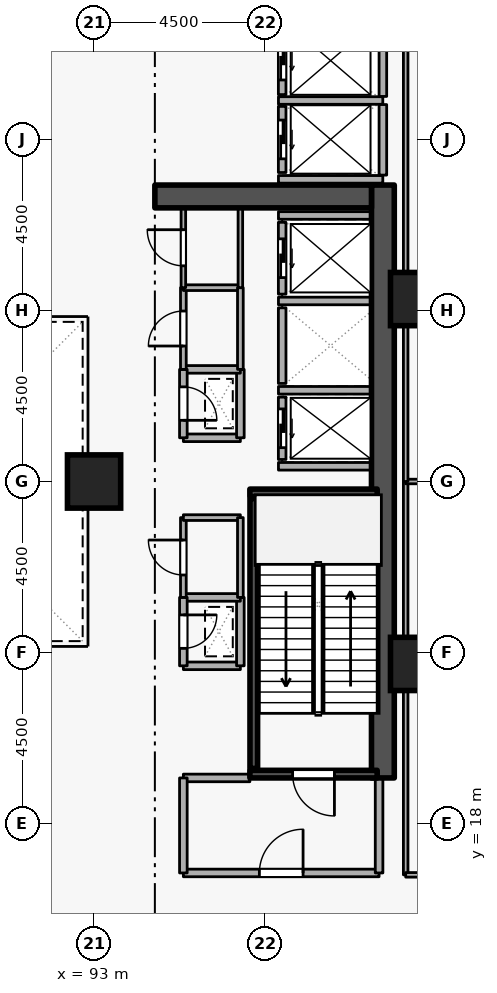
"""IFC4 building model, lengths in metres.
Left out: names, types, materials, properties, quantities, classifications, styles, units other than length and angle.
Written with IfcOpenShell. Run it as: python <this file> out.ifc"""

import sys

from ifc_helpers import new_model, si_unit, direction, frame, frame_2d, origin, origin_2d, place, context, subcontext, project, spatial, rectangle, extrude, element, fill, save


model = new_model("IFC4")
c1 = context("Model", 3, precision=1e-05, world=origin(), true_north=direction((0.0, 1.0)))
c2 = subcontext(c1, "Body", "Model", "MODEL_VIEW")
j1 = project(units=[si_unit("LENGTHUNIT", "METRE"), si_unit("PLANEANGLEUNIT", "RADIAN")], contexts=[c1])
p1 = place(None, origin())
s1 = spatial("IfcSite", under=j1, at=p1, CompositionType="ELEMENT")
p2 = place(p1, origin())
s2 = spatial("IfcBuilding", under=s1, at=p2, CompositionType="ELEMENT")
p3 = place(p2, frame((0.0, 0.0, 23.1)))
s3 = spatial("IfcBuildingStorey", under=s2, at=p3, CompositionType="ELEMENT", Elevation=23.1)
p4 = place(p3, frame((100.6, 19.2, 0.0), z_axis=(0.0, 0.0, 1.0), x_axis=(0.0, 1.0, 0.0)))
e1 = element("IfcWall", 1, at=p4, inside=s3, PredefinedType="SHEAR", context=c2, shape_type="SweptSolid", body=[
    extrude(rectangle(XDim=15.6, YDim=0.6, at=frame_2d((7.8, 0.0))), origin(), (0.0, 0.0, 1.0), 4.8),
])
p5 = place(p3, frame((94.6, 34.5, 0.0), z_axis=(0.0, 0.0, 1.0), x_axis=(1.0, 0.0, 0.0)))
e2 = element("IfcWall", 2, at=p5, inside=s3, PredefinedType="SHEAR", context=c2, shape_type="SweptSolid", body=[
    extrude(rectangle(XDim=5.7, YDim=0.6, at=frame_2d((2.85, 0.0))), origin(), (0.0, 0.0, 1.0), 4.8),
])
for number, where, z_axis, x_axis in (
    (3, (101.5, 22.2, 0.0), (0.0, 0.0, 1.0), (1.0, 0.0, 0.0)),
    (4, (101.5, 31.8, 0.0), (0.0, 0.0, 1.0), (1.0, 0.0, 0.0)),
    (5, (93.0, 27.0, 0.0), (0.0, 0.0, 1.0), (1.0, 0.0, 0.0)),
):
    element("IfcColumn", number, at=place(p3, frame(where, z_axis=z_axis, x_axis=x_axis)), inside=s3, PredefinedType="COLUMN", context=c2, shape_type="SweptSolid", body=[
        extrude(rectangle(XDim=1.4, YDim=1.4, at=origin_2d()), origin(), (0.0, 0.0, 1.0), 4.8),
    ])
p6 = place(p3, frame((97.95, 29.22, 0.0), z_axis=(0.0, 0.0, 1.0), x_axis=(0.0, -1.0, 0.0)))
e6 = element("IfcWall", 6, at=p6, inside=s3, PredefinedType="STANDARD", context=c2, shape_type="SweptSolid", body=[
    extrude(rectangle(XDim=1.64, YDim=0.2, at=frame_2d((0.82, 0.0))), origin(), (0.0, 0.0, 1.0), 4.54),
])
p7 = place(p6, frame((0.31, 0.0, 0.0)))
e7 = element("IfcOpeningElement", 7, at=p7, cuts=e6, PredefinedType="OPENING", context=c2, shape_type="SweptSolid", body=[
    extrude(rectangle(XDim=1.02, YDim=2.06, at=frame_2d((0.51, 1.03))), frame((0.0, 0.11, 0.0), z_axis=(0.0, -1.0, 0.0), x_axis=(1.0, 0.0, 0.0)), (0.0, 0.0, 1.0), 0.22),
])
p8 = place(p3, frame((97.95, 31.57, 0.0), z_axis=(0.0, 0.0, 1.0), x_axis=(0.0, -1.0, 0.0)))
e8 = element("IfcWall", 8, at=p8, inside=s3, PredefinedType="STANDARD", context=c2, shape_type="SweptSolid", body=[
    extrude(rectangle(XDim=1.99, YDim=0.2, at=frame_2d((0.995, 0.0))), origin(), (0.0, 0.0, 1.0), 4.54),
])
p9 = place(p3, frame((97.95, 33.82, 0.0), z_axis=(0.0, 0.0, 1.0), x_axis=(0.0, -1.0, 0.0)))
e9 = element("IfcWall", 9, at=p9, inside=s3, PredefinedType="STANDARD", context=c2, shape_type="SweptSolid", body=[
    extrude(rectangle(XDim=1.89, YDim=0.2, at=frame_2d((0.945, 0.0))), origin(), (0.0, 0.0, 1.0), 4.54),
])
p10 = place(p9, frame((0.435, 0.0, 0.0)))
e10 = element("IfcOpeningElement", 10, at=p10, cuts=e9, PredefinedType="OPENING", context=c2, shape_type="SweptSolid", body=[
    extrude(rectangle(XDim=1.02, YDim=2.06, at=frame_2d((0.51, 1.03))), frame((0.0, 0.11, 0.0), z_axis=(0.0, -1.0, 0.0), x_axis=(1.0, 0.0, 0.0)), (0.0, 0.0, 1.0), 0.22),
])
p11 = place(p3, frame((97.95, 36.87, 0.0), z_axis=(0.0, 0.0, 1.0), x_axis=(0.0, -1.0, 0.0)))
e11 = element("IfcWall", 11, at=p11, inside=s3, PredefinedType="STANDARD", context=c2, shape_type="SweptSolid", body=[
    extrude(rectangle(XDim=1.74, YDim=0.2, at=frame_2d((0.87, 0.0))), origin(), (0.0, 0.0, 1.0), 4.54),
])
p12 = place(p11, frame((0.36, 0.0, 0.0)))
e12 = element("IfcOpeningElement", 12, at=p12, cuts=e11, PredefinedType="OPENING", context=c2, shape_type="SweptSolid", body=[
    extrude(rectangle(XDim=1.02, YDim=2.06, at=frame_2d((0.51, 1.03))), frame((0.0, 0.11, 0.0), z_axis=(0.0, -1.0, 0.0), x_axis=(1.0, 0.0, 0.0)), (0.0, 0.0, 1.0), 0.22),
])
p13 = place(p3, frame((97.95, 38.97, 0.0), z_axis=(0.0, 0.0, 1.0), x_axis=(0.0, -1.0, 0.0)))
e13 = element("IfcWall", 13, at=p13, inside=s3, PredefinedType="STANDARD", context=c2, shape_type="SweptSolid", body=[
    extrude(rectangle(XDim=1.79, YDim=0.2, at=frame_2d((0.895, 0.0))), origin(), (0.0, 0.0, 1.0), 4.54),
])
p14 = place(p13, frame((0.385, 0.0, 0.0)))
e14 = element("IfcOpeningElement", 14, at=p14, cuts=e13, PredefinedType="OPENING", context=c2, shape_type="SweptSolid", body=[
    extrude(rectangle(XDim=1.02, YDim=2.06, at=frame_2d((0.51, 1.03))), frame((0.0, 0.11, 0.0), z_axis=(0.0, -1.0, 0.0), x_axis=(1.0, 0.0, 0.0)), (0.0, 0.0, 1.0), 0.22),
])
p15 = place(p3, frame((97.852, 29.4, 0.0), z_axis=(0.0, 0.0, 1.0), x_axis=(1.0, 0.0, 0.0)))
e15 = element("IfcWall", 15, at=p15, inside=s3, PredefinedType="STANDARD", context=c2, shape_type="SweptSolid", body=[
    extrude(rectangle(XDim=2.436, YDim=0.2, at=frame_2d((1.218, 0.0))), origin(), (0.0, 0.0, 1.0), 4.54),
])
p16 = place(p3, frame((97.852, 27.4, 0.0), z_axis=(0.0, 0.0, 1.0), x_axis=(1.0, 0.0, 0.0)))
e16 = element("IfcWall", 16, at=p16, inside=s3, PredefinedType="STANDARD", context=c2, shape_type="SweptSolid", body=[
    extrude(rectangle(XDim=2.436, YDim=0.2, at=frame_2d((1.218, 0.0))), origin(), (0.0, 0.0, 1.0), 2.885),
])
for number, where, z_axis, x_axis in (
    (17, (97.852, 31.75, 0.0), (0.0, 0.0, 1.0), (1.0, 0.0, 0.0)),
    (18, (97.852, 34.0, 0.0), (0.0, 0.0, 1.0), (1.0, 0.0, 0.0)),
):
    element("IfcWall", number, at=place(p3, frame(where, z_axis=z_axis, x_axis=x_axis)), inside=s3, PredefinedType="STANDARD", context=c2, shape_type="SweptSolid", body=[
        extrude(rectangle(XDim=2.436, YDim=0.2, at=frame_2d((1.218, 0.0))), origin(), (0.0, 0.0, 1.0), 4.54),
    ])
for number, where, z_axis, x_axis in (
    (19, (97.852, 37.025, 0.0), (0.0, 0.0, 1.0), (1.0, 0.0, 0.0)),
    (20, (97.852, 34.95, 0.0), (0.0, 0.0, 1.0), (1.0, 0.0, 0.0)),
):
    element("IfcWall", number, at=place(p3, frame(where, z_axis=z_axis, x_axis=x_axis)), inside=s3, PredefinedType="STANDARD", context=c2, shape_type="SweptSolid", body=[
        extrude(rectangle(XDim=2.746, YDim=0.2, at=frame_2d((1.373, 0.0))), origin(), (0.0, 0.0, 1.0), 4.54),
    ])
p17 = place(p3, frame((100.6, 35.062, 0.0), z_axis=(0.0, 0.0, 1.0), x_axis=(0.0, 1.0, 0.0)))
e21 = element("IfcWall", 21, at=p17, inside=s3, PredefinedType="STANDARD", context=c2, shape_type="SweptSolid", body=[
    extrude(rectangle(XDim=1.856, YDim=0.2, at=frame_2d((0.928, 0.0))), origin(), (0.0, 0.0, 1.0), 4.54),
])
p18 = place(p3, frame((100.6, 37.132, 0.0), z_axis=(0.0, 0.0, 1.0), x_axis=(0.0, 1.0, 0.0)))
e22 = element("IfcWall", 22, at=p18, inside=s3, PredefinedType="STANDARD", context=c2, shape_type="SweptSolid", body=[
    extrude(rectangle(XDim=2.016, YDim=0.2, at=frame_2d((1.008, 0.0))), origin(), (0.0, 0.0, 1.0), 4.54),
])
p19 = place(p3, frame((100.45, 19.3, 0.0), z_axis=(0.0, 0.0, 1.0), x_axis=(-1.0, 0.0, 0.0)))
e23 = element("IfcWall", 23, at=p19, inside=s3, PredefinedType="SHEAR", context=c2, shape_type="SweptSolid", body=[
    extrude(rectangle(XDim=3.35, YDim=0.2, at=frame_2d((1.675, 0.0))), origin(), (0.0, 0.0, 1.0), 4.8),
])
p20 = place(p19, frame((1.125, 0.0, 0.0)))
e24 = element("IfcOpeningElement", 24, at=p20, cuts=e23, PredefinedType="OPENING", context=c2, shape_type="SweptSolid", body=[
    extrude(rectangle(XDim=1.1, YDim=2.1, at=frame_2d((0.55, 1.05))), frame((0.0, 0.11, 0.0), z_axis=(0.0, -1.0, 0.0), x_axis=(1.0, 0.0, 0.0)), (0.0, 0.0, 1.0), 0.22),
])
p21 = place(p3, frame((97.1, 26.7, 0.0), z_axis=(0.0, 0.0, 1.0), x_axis=(1.0, 0.0, 0.0)))
e25 = element("IfcWall", 25, at=p21, inside=s3, PredefinedType="SHEAR", context=c2, shape_type="SweptSolid", body=[
    extrude(rectangle(XDim=3.35, YDim=0.2, at=frame_2d((1.675, 0.0))), origin(), (0.0, 0.0, 1.0), 4.8),
])
p22 = place(p3, frame((97.203, 26.55, 0.0), z_axis=(0.0, 0.0, 1.0), x_axis=(0.0, -1.0, 0.0)))
e26 = element("IfcWall", 26, at=p22, inside=s3, PredefinedType="SHEAR", context=c2, shape_type="SweptSolid", body=[
    extrude(rectangle(XDim=7.1, YDim=0.2, at=frame_2d((3.55, 0.0))), origin(), (0.0, 0.0, 1.0), 4.8),
])
p23 = place(p3, frame((95.35, 16.7, 0.0), z_axis=(0.0, 0.0, 1.0), x_axis=(1.0, 0.0, 0.0)))
e27 = element("IfcWall", 27, at=p23, inside=s3, PredefinedType="STANDARD", context=c2, shape_type="SweptSolid", body=[
    extrude(rectangle(XDim=5.15, YDim=0.2, at=frame_2d((2.575, 0.0))), origin(), (0.0, 0.0, 1.0), 4.54),
])
p24 = place(p23, frame((2.0, 0.0, 0.0)))
e28 = element("IfcOpeningElement", 28, at=p24, cuts=e27, PredefinedType="OPENING", context=c2, shape_type="SweptSolid", body=[
    extrude(rectangle(XDim=1.15, YDim=2.1, at=frame_2d((0.575, 1.05))), frame((0.0, 0.11, 0.0), z_axis=(0.0, -1.0, 0.0), x_axis=(1.0, 0.0, 0.0)), (0.0, 0.0, 1.0), 0.22),
])
p25 = place(p3, frame((100.5, 16.7, 0.0), z_axis=(0.0, 0.0, 1.0), x_axis=(0.0, 1.0, 0.0)))
e29 = element("IfcWall", 29, at=p25, inside=s3, PredefinedType="STANDARD", context=c2, shape_type="SweptSolid", body=[
    extrude(rectangle(XDim=2.5, YDim=0.2, at=frame_2d((1.25, 0.0))), origin(), (0.0, 0.0, 1.0), 4.54),
])
p26 = place(p3, frame((97.1, 19.2, 0.0), z_axis=(0.0, 0.0, 1.0), x_axis=(-1.0, 0.0, 0.0)))
e30 = element("IfcWall", 30, at=p26, inside=s3, PredefinedType="STANDARD", context=c2, shape_type="SweptSolid", body=[
    extrude(rectangle(XDim=1.75, YDim=0.2, at=frame_2d((0.875, 0.0))), origin(), (0.0, 0.0, 1.0), 3.745),
])
p27 = place(p3, frame((95.35, 19.2, 0.0), z_axis=(0.0, 0.0, 1.0), x_axis=(0.0, -1.0, 0.0)))
e31 = element("IfcWall", 31, at=p27, inside=s3, PredefinedType="STANDARD", context=c2, shape_type="SweptSolid", body=[
    extrude(rectangle(XDim=2.5, YDim=0.2, at=frame_2d((1.25, 0.0))), origin(), (0.0, 0.0, 1.0), 4.54),
])
p28 = place(p3, frame((95.35, 28.15, 0.0), z_axis=(0.0, 0.0, 1.0), x_axis=(1.0, 0.0, 0.0)))
e32 = element("IfcWall", 32, at=p28, inside=s3, PredefinedType="STANDARD", context=c2, shape_type="SweptSolid", body=[
    extrude(rectangle(XDim=1.5, YDim=0.2, at=frame_2d((0.75, 0.0))), origin(), (0.0, 0.0, 1.0), 4.54),
])
p29 = place(p3, frame((96.85, 28.15, 0.0), z_axis=(0.0, 0.0, 1.0), x_axis=(0.0, 1.0, 0.0)))
e33 = element("IfcWall", 33, at=p29, inside=s3, PredefinedType="STANDARD", context=c2, shape_type="SweptSolid", body=[
    extrude(rectangle(XDim=1.8, YDim=0.2, at=frame_2d((0.9, 0.0))), origin(), (0.0, 0.0, 1.0), 4.54),
])
p30 = place(p3, frame((96.85, 29.95, 0.0), z_axis=(0.0, 0.0, 1.0), x_axis=(-1.0, 0.0, 0.0)))
e34 = element("IfcWall", 34, at=p30, inside=s3, PredefinedType="STANDARD", context=c2, shape_type="SweptSolid", body=[
    extrude(rectangle(XDim=1.5, YDim=0.2, at=frame_2d((0.75, 0.0))), origin(), (0.0, 0.0, 1.0), 4.54),
])
p31 = place(p3, frame((95.35, 29.95, 0.0), z_axis=(0.0, 0.0, 1.0), x_axis=(0.0, -1.0, 0.0)))
e35 = element("IfcWall", 35, at=p31, inside=s3, PredefinedType="STANDARD", context=c2, shape_type="SweptSolid", body=[
    extrude(rectangle(XDim=1.8, YDim=0.2, at=frame_2d((0.9, 0.0))), origin(), (0.0, 0.0, 1.0), 4.54),
])
p32 = place(p31, frame((0.46, 0.0, 0.0)))
e36 = element("IfcOpeningElement", 36, at=p32, cuts=e35, PredefinedType="OPENING", context=c2, shape_type="SweptSolid", body=[
    extrude(rectangle(XDim=0.88, YDim=2.04, at=frame_2d((0.44, 1.02))), frame((0.0, 0.11, 0.0), z_axis=(0.0, -1.0, 0.0), x_axis=(1.0, 0.0, 0.0)), (0.0, 0.0, 1.0), 0.22),
])
p33 = place(p3, frame((95.35, 22.15, 0.0), z_axis=(0.0, 0.0, 1.0), x_axis=(1.0, 0.0, 0.0)))
e37 = element("IfcWall", 37, at=p33, inside=s3, PredefinedType="STANDARD", context=c2, shape_type="SweptSolid", body=[
    extrude(rectangle(XDim=1.5, YDim=0.2, at=frame_2d((0.75, 0.0))), origin(), (0.0, 0.0, 1.0), 4.54),
])
p34 = place(p3, frame((96.85, 22.15, 0.0), z_axis=(0.0, 0.0, 1.0), x_axis=(0.0, 1.0, 0.0)))
e38 = element("IfcWall", 38, at=p34, inside=s3, PredefinedType="STANDARD", context=c2, shape_type="SweptSolid", body=[
    extrude(rectangle(XDim=1.8, YDim=0.2, at=frame_2d((0.9, 0.0))), origin(), (0.0, 0.0, 1.0), 4.54),
])
p35 = place(p3, frame((96.85, 23.95, 0.0), z_axis=(0.0, 0.0, 1.0), x_axis=(-1.0, 0.0, 0.0)))
e39 = element("IfcWall", 39, at=p35, inside=s3, PredefinedType="STANDARD", context=c2, shape_type="SweptSolid", body=[
    extrude(rectangle(XDim=1.5, YDim=0.2, at=frame_2d((0.75, 0.0))), origin(), (0.0, 0.0, 1.0), 4.54),
])
p36 = place(p3, frame((95.35, 23.95, 0.0), z_axis=(0.0, 0.0, 1.0), x_axis=(0.0, -1.0, 0.0)))
e40 = element("IfcWall", 40, at=p36, inside=s3, PredefinedType="STANDARD", context=c2, shape_type="SweptSolid", body=[
    extrude(rectangle(XDim=1.8, YDim=0.2, at=frame_2d((0.9, 0.0))), origin(), (0.0, 0.0, 1.0), 4.54),
])
p37 = place(p36, frame((0.46, 0.0, 0.0)))
e41 = element("IfcOpeningElement", 41, at=p37, cuts=e40, PredefinedType="OPENING", context=c2, shape_type="SweptSolid", body=[
    extrude(rectangle(XDim=0.88, YDim=2.04, at=frame_2d((0.44, 1.02))), frame((0.0, 0.11, 0.0), z_axis=(0.0, -1.0, 0.0), x_axis=(1.0, 0.0, 0.0)), (0.0, 0.0, 1.0), 0.22),
])
p38 = place(p3, frame((95.35, 23.95, 0.0), z_axis=(0.0, 0.0, 1.0), x_axis=(0.0, 1.0, 0.0)))
e42 = element("IfcWall", 42, at=p38, inside=s3, PredefinedType="PARTITIONING", context=c2, shape_type="SweptSolid", body=[
    extrude(rectangle(XDim=2.1, YDim=0.15, at=frame_2d((1.05, 0.0))), origin(), (0.0, 0.0, 1.0), 4.54),
])
p39 = place(p38, frame((0.59, 0.0, 0.0)))
e43 = element("IfcOpeningElement", 43, at=p39, cuts=e42, PredefinedType="OPENING", context=c2, shape_type="SweptSolid", body=[
    extrude(rectangle(XDim=0.92, YDim=2.08, at=frame_2d((0.46, 1.04))), frame((0.0, 0.085, 0.0), z_axis=(0.0, -1.0, 0.0), x_axis=(1.0, 0.0, 0.0)), (0.0, 0.0, 1.0), 0.17),
])
p40 = place(p3, frame((95.35, 26.05, 0.0), z_axis=(0.0, 0.0, 1.0), x_axis=(1.0, 0.0, 0.0)))
e44 = element("IfcWall", 44, at=p40, inside=s3, PredefinedType="PARTITIONING", context=c2, shape_type="SweptSolid", body=[
    extrude(rectangle(XDim=1.5, YDim=0.15, at=frame_2d((0.75, 0.0))), origin(), (0.0, 0.0, 1.0), 4.54),
])
p41 = place(p3, frame((96.85, 26.05, 0.0), z_axis=(0.0, 0.0, 1.0), x_axis=(0.0, -1.0, 0.0)))
e45 = element("IfcWall", 45, at=p41, inside=s3, PredefinedType="PARTITIONING", context=c2, shape_type="SweptSolid", body=[
    extrude(rectangle(XDim=2.1, YDim=0.15, at=frame_2d((1.05, 0.0))), origin(), (0.0, 0.0, 1.0), 4.54),
])
p42 = place(p3, frame((95.35, 29.95, 0.0), z_axis=(0.0, 0.0, 1.0), x_axis=(0.0, 1.0, 0.0)))
e46 = element("IfcWall", 46, at=p42, inside=s3, PredefinedType="PARTITIONING", context=c2, shape_type="SweptSolid", body=[
    extrude(rectangle(XDim=2.15, YDim=0.15, at=frame_2d((1.075, 0.0))), origin(), (0.0, 0.0, 1.0), 4.54),
])
p43 = place(p42, frame((0.615, 0.0, 0.0)))
e47 = element("IfcOpeningElement", 47, at=p43, cuts=e46, PredefinedType="OPENING", context=c2, shape_type="SweptSolid", body=[
    extrude(rectangle(XDim=0.92, YDim=2.08, at=frame_2d((0.46, 1.04))), frame((0.0, 0.085, 0.0), z_axis=(0.0, -1.0, 0.0), x_axis=(1.0, 0.0, 0.0)), (0.0, 0.0, 1.0), 0.17),
])
p44 = place(p3, frame((95.35, 32.1, 0.0), z_axis=(0.0, 0.0, 1.0), x_axis=(1.0, 0.0, 0.0)))
e48 = element("IfcWall", 48, at=p44, inside=s3, PredefinedType="PARTITIONING", context=c2, shape_type="SweptSolid", body=[
    extrude(rectangle(XDim=1.5, YDim=0.15, at=frame_2d((0.75, 0.0))), origin(), (0.0, 0.0, 1.0), 4.54),
])
p45 = place(p3, frame((96.85, 32.1, 0.0), z_axis=(0.0, 0.0, 1.0), x_axis=(0.0, -1.0, 0.0)))
e49 = element("IfcWall", 49, at=p45, inside=s3, PredefinedType="PARTITIONING", context=c2, shape_type="SweptSolid", body=[
    extrude(rectangle(XDim=2.15, YDim=0.15, at=frame_2d((1.075, 0.0))), origin(), (0.0, 0.0, 1.0), 4.54),
])
p46 = place(p3, frame((95.35, 32.1, 0.0), z_axis=(0.0, 0.0, 1.0), x_axis=(0.0, 1.0, 0.0)))
e50 = element("IfcWall", 50, at=p46, inside=s3, PredefinedType="PARTITIONING", context=c2, shape_type="SweptSolid", body=[
    extrude(rectangle(XDim=2.1, YDim=0.12, at=frame_2d((1.05, 0.0))), origin(), (0.0, 0.0, 1.0), 4.54),
])
p47 = place(p46, frame((0.575, 0.0, 0.0)))
e51 = element("IfcOpeningElement", 51, at=p47, cuts=e50, PredefinedType="OPENING", context=c2, shape_type="SweptSolid", body=[
    extrude(rectangle(XDim=0.95, YDim=2.1, at=frame_2d((0.475, 1.05))), frame((0.0, 0.07, 0.0), z_axis=(0.0, -1.0, 0.0), x_axis=(1.0, 0.0, 0.0)), (0.0, 0.0, 1.0), 0.14),
])
p48 = place(p3, frame((96.85, 34.2, 0.0), z_axis=(0.0, 0.0, 1.0), x_axis=(0.0, -1.0, 0.0)))
e52 = element("IfcWall", 52, at=p48, inside=s3, PredefinedType="PARTITIONING", context=c2, shape_type="SweptSolid", body=[
    extrude(rectangle(XDim=2.1, YDim=0.12, at=frame_2d((1.05, 0.0))), origin(), (0.0, 0.0, 1.0), 4.54),
])
p49 = place(p3, frame((101.2, 16.65, 0.0), z_axis=(0.0, 0.0, 1.0), x_axis=(0.0, 1.0, 0.0)))
e53 = element("IfcWall", 53, at=p49, inside=s3, PredefinedType="PARTITIONING", context=c2, shape_type="SweptSolid", body=[
    extrude(rectangle(XDim=10.35, YDim=0.12, at=frame_2d((5.175, 0.0))), origin(), (0.0, 0.0, 1.0), 2.885),
])
p50 = place(p3, frame((101.2, 27.0, 0.0), z_axis=(0.0, 0.0, 1.0), x_axis=(1.0, 0.0, 0.0)))
e54 = element("IfcWall", 54, at=p50, inside=s3, PredefinedType="PARTITIONING", context=c2, shape_type="SweptSolid", body=[
    extrude(rectangle(XDim=6.834, YDim=0.12, at=frame_2d((3.417, 0.0))), origin(), (0.0, 0.0, 1.0), 2.885),
])
p51 = place(p3, frame((110.7, 16.65, 0.0), z_axis=(0.0, 0.0, 1.0), x_axis=(-1.0, 0.0, 0.0)))
e55 = element("IfcWall", 55, at=p51, inside=s3, PredefinedType="PARTITIONING", context=c2, shape_type="SweptSolid", body=[
    extrude(rectangle(XDim=9.5, YDim=0.12, at=frame_2d((4.75, 0.0))), origin(), (0.0, 0.0, 1.0), 4.54),
])
p52 = place(p51, frame((4.225, 0.0, 0.0)))
e56 = element("IfcOpeningElement", 56, at=p52, cuts=e55, PredefinedType="OPENING", context=c2, shape_type="SweptSolid", body=[
    extrude(rectangle(XDim=1.05, YDim=2.1, at=frame_2d((0.525, 1.05))), frame((0.0, 0.07, 0.0), z_axis=(0.0, -1.0, 0.0), x_axis=(1.0, 0.0, 0.0)), (0.0, 0.0, 1.0), 0.14),
])
p53 = place(p3, frame((101.2, 27.0, 0.0), z_axis=(0.0, 0.0, 1.0), x_axis=(0.0, 1.0, 0.0)))
e57 = element("IfcWall", 57, at=p53, inside=s3, PredefinedType="PARTITIONING", context=c2, shape_type="SweptSolid", body=[
    extrude(rectangle(XDim=13.8, YDim=0.12, at=frame_2d((6.9, 0.0))), origin(), (0.0, 0.0, 1.0), 4.54),
])
p54 = place(p7, origin())
e58 = element("IfcDoor", 58, at=p54, inside=s3, OperationType="SLIDING_TO_LEFT", PredefinedType="DOOR", context=c2, shape_type="SweptSolid", body=[
    extrude(rectangle(XDim=1.02, YDim=2.06, at=frame_2d((0.51, 1.03))), frame((0.0, 0.025, 0.0), z_axis=(0.0, -1.0, 0.0), x_axis=(1.0, 0.0, 0.0)), (0.0, 0.0, 1.0), 0.05),
])
fill(e7, e58)
p55 = place(p10, origin())
e59 = element("IfcDoor", 59, at=p55, inside=s3, OperationType="SLIDING_TO_LEFT", PredefinedType="DOOR", context=c2, shape_type="SweptSolid", body=[
    extrude(rectangle(XDim=1.02, YDim=2.06, at=frame_2d((0.51, 1.03))), frame((0.0, 0.025, 0.0), z_axis=(0.0, -1.0, 0.0), x_axis=(1.0, 0.0, 0.0)), (0.0, 0.0, 1.0), 0.05),
])
fill(e10, e59)
p56 = place(p12, origin())
e60 = element("IfcDoor", 60, at=p56, inside=s3, OperationType="SLIDING_TO_LEFT", PredefinedType="DOOR", context=c2, shape_type="SweptSolid", body=[
    extrude(rectangle(XDim=1.02, YDim=2.06, at=frame_2d((0.51, 1.03))), frame((0.0, 0.025, 0.0), z_axis=(0.0, -1.0, 0.0), x_axis=(1.0, 0.0, 0.0)), (0.0, 0.0, 1.0), 0.05),
])
fill(e12, e60)
p57 = place(p14, origin())
e61 = element("IfcDoor", 61, at=p57, inside=s3, OperationType="SLIDING_TO_LEFT", PredefinedType="DOOR", context=c2, shape_type="SweptSolid", body=[
    extrude(rectangle(XDim=1.02, YDim=2.06, at=frame_2d((0.51, 1.03))), frame((0.0, 0.025, 0.0), z_axis=(0.0, -1.0, 0.0), x_axis=(1.0, 0.0, 0.0)), (0.0, 0.0, 1.0), 0.05),
])
fill(e14, e61)
p58 = place(p20, origin())
e62 = element("IfcDoor", 62, at=p58, inside=s3, OperationType="SINGLE_SWING_LEFT", PredefinedType="DOOR", context=c2, shape_type="SweptSolid", body=[
    extrude(rectangle(XDim=1.1, YDim=2.1, at=frame_2d((0.55, 1.05))), frame((0.0, 0.025, 0.0), z_axis=(0.0, -1.0, 0.0), x_axis=(1.0, 0.0, 0.0)), (0.0, 0.0, 1.0), 0.05),
])
fill(e24, e62)
p59 = place(p24, origin())
e63 = element("IfcDoor", 63, at=p59, inside=s3, OperationType="SINGLE_SWING_RIGHT", PredefinedType="DOOR", context=c2, shape_type="SweptSolid", body=[
    extrude(rectangle(XDim=1.15, YDim=2.1, at=frame_2d((0.575, 1.05))), frame((0.0, 0.025, 0.0), z_axis=(0.0, -1.0, 0.0), x_axis=(1.0, 0.0, 0.0)), (0.0, 0.0, 1.0), 0.05),
])
fill(e28, e63)
p60 = place(p32, origin())
e64 = element("IfcDoor", 64, at=p60, inside=s3, OperationType="SINGLE_SWING_RIGHT", PredefinedType="DOOR", context=c2, shape_type="SweptSolid", body=[
    extrude(rectangle(XDim=0.88, YDim=2.04, at=frame_2d((0.44, 1.02))), frame((0.0, 0.025, 0.0), z_axis=(0.0, -1.0, 0.0), x_axis=(1.0, 0.0, 0.0)), (0.0, 0.0, 1.0), 0.05),
])
fill(e36, e64)
p61 = place(p37, origin())
e65 = element("IfcDoor", 65, at=p61, inside=s3, OperationType="SINGLE_SWING_LEFT", PredefinedType="DOOR", context=c2, shape_type="SweptSolid", body=[
    extrude(rectangle(XDim=0.88, YDim=2.04, at=frame_2d((0.44, 1.02))), frame((0.0, 0.025, 0.0), z_axis=(0.0, -1.0, 0.0), x_axis=(1.0, 0.0, 0.0)), (0.0, 0.0, 1.0), 0.05),
])
fill(e41, e65)
p62 = place(p39, origin())
e66 = element("IfcDoor", 66, at=p62, inside=s3, OperationType="SINGLE_SWING_RIGHT", PredefinedType="DOOR", context=c2, shape_type="SweptSolid", body=[
    extrude(rectangle(XDim=0.92, YDim=2.08, at=frame_2d((0.46, 1.04))), frame((0.0, 0.025, 0.0), z_axis=(0.0, -1.0, 0.0), x_axis=(1.0, 0.0, 0.0)), (0.0, 0.0, 1.0), 0.05),
])
fill(e43, e66)
p63 = place(p43, origin())
e67 = element("IfcDoor", 67, at=p63, inside=s3, OperationType="SINGLE_SWING_LEFT", PredefinedType="DOOR", context=c2, shape_type="SweptSolid", body=[
    extrude(rectangle(XDim=0.92, YDim=2.08, at=frame_2d((0.46, 1.04))), frame((0.0, 0.025, 0.0), z_axis=(0.0, -1.0, 0.0), x_axis=(1.0, 0.0, 0.0)), (0.0, 0.0, 1.0), 0.05),
])
fill(e47, e67)
p64 = place(p47, origin())
e68 = element("IfcDoor", 68, at=p64, inside=s3, OperationType="SINGLE_SWING_RIGHT", PredefinedType="DOOR", context=c2, shape_type="SweptSolid", body=[
    extrude(rectangle(XDim=0.95, YDim=2.1, at=frame_2d((0.475, 1.05))), frame((0.0, 0.025, 0.0), z_axis=(0.0, -1.0, 0.0), x_axis=(1.0, 0.0, 0.0)), (0.0, 0.0, 1.0), 0.05),
])
fill(e51, e68)
save(model, sys.argv[1])
